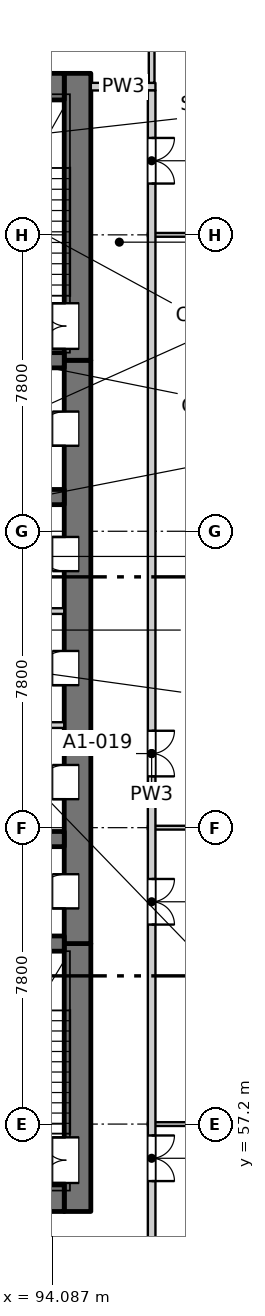
"""IFC4 building model, lengths in metres.
Left out: names, types, materials, properties, quantities, classifications, styles, units other than length and angle.
Written with IfcOpenShell. Run it as: python <this file> out.ifc"""

import sys

from ifc_helpers import new_model, si_unit, direction, frame, frame_2d, origin, place, context, subcontext, project, spatial, rectangle, extrude, element, fill, save


model = new_model("IFC4")
c1 = context("Model", 3, precision=1e-05, world=origin(), true_north=direction((0.0, 1.0)))
c2 = subcontext(c1, "Body", "Model", "MODEL_VIEW")
j1 = project(units=[si_unit("LENGTHUNIT", "METRE"), si_unit("PLANEANGLEUNIT", "RADIAN")], contexts=[c1])
p1 = place(None, origin())
s1 = spatial("IfcSite", under=j1, at=p1, CompositionType="ELEMENT")
p2 = place(p1, origin())
s2 = spatial("IfcBuilding", under=s1, at=p2, CompositionType="ELEMENT")
p3 = place(p2, frame((0.0, 0.0, 15.0)))
s3 = spatial("IfcBuildingStorey", under=s2, at=p3, CompositionType="ELEMENT", Elevation=15.0)
p4 = place(p3, frame((94.75, 54.9, -0.35), z_axis=(0.0, 0.0, 1.0), x_axis=(0.0, 1.0, 0.0)))
e1 = element("IfcWall", 1, at=p4, inside=s3, PredefinedType="SOLIDWALL", context=c2, shape_type="SweptSolid", body=[
    extrude(rectangle(XDim=7.05, YDim=0.7, at=frame_2d((3.525, 0.0))), origin(), (0.0, 0.0, 1.0), 4.6),
])
p5 = place(p4, frame((0.75, 0.0, 0.35)))
e2 = element("IfcOpeningElement", 2, at=p5, cuts=e1, PredefinedType="OPENING", context=c2, shape_type="SweptSolid", body=[
    extrude(rectangle(XDim=1.2, YDim=2.1, at=frame_2d((0.6, 1.05))), frame((0.0, 0.36, 0.0), z_axis=(0.0, -1.0, 0.0), x_axis=(1.0, 0.0, 0.0)), (0.0, 0.0, 1.0), 0.72),
])
p6 = place(p3, frame((94.75, 61.95, -0.35), z_axis=(0.0, 0.0, 1.0), x_axis=(0.0, 1.0, 0.0)))
e3 = element("IfcWall", 3, at=p6, inside=s3, PredefinedType="SOLIDWALL", context=c2, shape_type="SweptSolid", body=[
    extrude(rectangle(XDim=15.35, YDim=0.7, at=frame_2d((7.675, 0.0))), origin(), (0.0, 0.0, 1.0), 4.6),
])
p7 = place(p6, frame((0.925, 0.0, 0.35)))
e4 = element("IfcOpeningElement", 4, at=p7, cuts=e3, PredefinedType="OPENING", context=c2, shape_type="SweptSolid", body=[
    extrude(rectangle(XDim=0.9, YDim=2.1, at=frame_2d((0.45, 1.05))), frame((0.0, 0.36, 0.0), z_axis=(0.0, -1.0, 0.0), x_axis=(1.0, 0.0, 0.0)), (0.0, 0.0, 1.0), 0.72),
])
p8 = place(p6, frame((3.8, 0.0, 0.35)))
e5 = element("IfcOpeningElement", 5, at=p8, cuts=e3, PredefinedType="OPENING", context=c2, shape_type="SweptSolid", body=[
    extrude(rectangle(XDim=0.9, YDim=2.1, at=frame_2d((0.45, 1.05))), frame((0.0, 0.36, 0.0), z_axis=(0.0, -1.0, 0.0), x_axis=(1.0, 0.0, 0.0)), (0.0, 0.0, 1.0), 0.72),
])
p9 = place(p6, frame((6.8, 0.0, 0.35)))
e6 = element("IfcOpeningElement", 6, at=p9, cuts=e3, PredefinedType="OPENING", context=c2, shape_type="SweptSolid", body=[
    extrude(rectangle(XDim=0.9, YDim=2.1, at=frame_2d((0.45, 1.05))), frame((0.0, 0.36, 0.0), z_axis=(0.0, -1.0, 0.0), x_axis=(1.0, 0.0, 0.0)), (0.0, 0.0, 1.0), 0.72),
])
p10 = place(p6, frame((9.8, 0.0, 0.35)))
e7 = element("IfcOpeningElement", 7, at=p10, cuts=e3, PredefinedType="OPENING", context=c2, shape_type="SweptSolid", body=[
    extrude(rectangle(XDim=0.9, YDim=2.1, at=frame_2d((0.45, 1.05))), frame((0.0, 0.36, 0.0), z_axis=(0.0, -1.0, 0.0), x_axis=(1.0, 0.0, 0.0)), (0.0, 0.0, 1.0), 0.72),
])
p11 = place(p6, frame((13.1, 0.0, 0.35)))
e8 = element("IfcOpeningElement", 8, at=p11, cuts=e3, PredefinedType="OPENING", context=c2, shape_type="SweptSolid", body=[
    extrude(rectangle(XDim=0.9, YDim=2.1, at=frame_2d((0.45, 1.05))), frame((0.0, 0.36, 0.0), z_axis=(0.0, -1.0, 0.0), x_axis=(1.0, 0.0, 0.0)), (0.0, 0.0, 1.0), 0.72),
])
p12 = place(p3, frame((94.75, 77.3, -0.35), z_axis=(0.0, 0.0, 1.0), x_axis=(0.0, 1.0, 0.0)))
e9 = element("IfcWall", 9, at=p12, inside=s3, PredefinedType="SOLIDWALL", context=c2, shape_type="SweptSolid", body=[
    extrude(rectangle(XDim=7.55, YDim=0.7, at=frame_2d((3.775, 0.0))), origin(), (0.0, 0.0, 1.0), 4.6),
])
p13 = place(p12, frame((0.3, 0.0, 0.35)))
e10 = element("IfcOpeningElement", 10, at=p13, cuts=e9, PredefinedType="OPENING", context=c2, shape_type="SweptSolid", body=[
    extrude(rectangle(XDim=1.2, YDim=2.1, at=frame_2d((0.6, 1.05))), frame((0.0, 0.36, 0.0), z_axis=(0.0, -1.0, 0.0), x_axis=(1.0, 0.0, 0.0)), (0.0, 0.0, 1.0), 0.72),
])
p14 = place(p3, frame((75.6, 55.25, -0.35), z_axis=(0.0, 0.0, 1.0), x_axis=(1.0, 0.0, 0.0)))
e11 = element("IfcWall", 11, at=p14, inside=s3, PredefinedType="SOLIDWALL", context=c2, shape_type="SweptSolid", body=[
    extrude(rectangle(XDim=18.8, YDim=0.7, at=frame_2d((9.4, 0.0))), origin(), (0.0, 0.0, 1.0), 4.6),
])
p15 = place(p14, frame((8.65, 0.0, 0.35)))
e12 = element("IfcOpeningElement", 12, at=p15, cuts=e11, PredefinedType="OPENING", context=c2, shape_type="SweptSolid", body=[
    extrude(rectangle(XDim=1.5, YDim=2.1, at=frame_2d((0.75, 1.05))), frame((0.0, 0.36, 0.0), z_axis=(0.0, -1.0, 0.0), x_axis=(1.0, 0.0, 0.0)), (0.0, 0.0, 1.0), 0.72),
])
p16 = place(p3, frame((75.6, 84.5, -0.35), z_axis=(0.0, 0.0, 1.0), x_axis=(1.0, 0.0, 0.0)))
e13 = element("IfcWall", 13, at=p16, inside=s3, PredefinedType="SOLIDWALL", context=c2, shape_type="SweptSolid", body=[
    extrude(rectangle(XDim=18.8, YDim=0.7, at=frame_2d((9.4, 0.0))), origin(), (0.0, 0.0, 1.0), 4.6),
])
for number, where, z_axis, x_axis in (
    (14, (90.75, 61.95, -0.35), (0.0, 0.0, 1.0), (1.0, 0.0, 0.0)),
    (15, (90.75, 64.7, -0.35), (0.0, 0.0, 1.0), (1.0, 0.0, 0.0)),
    (16, (90.75, 73.7, -0.35), (0.0, 0.0, 1.0), (1.0, 0.0, 0.0)),
    (17, (90.75, 77.3, -0.35), (0.0, 0.0, 1.0), (1.0, 0.0, 0.0)),
):
    element("IfcWall", number, at=place(p3, frame(where, z_axis=z_axis, x_axis=x_axis)), inside=s3, PredefinedType="SOLIDWALL", context=c2, shape_type="SweptSolid", body=[
        extrude(rectangle(XDim=3.65, YDim=0.4, at=frame_2d((1.825, 0.0))), origin(), (0.0, 0.0, 1.0), 4.6),
    ])
for number, where, z_axis, x_axis in (
    (18, (96.6, 57.2, 0.0), (0.0, 0.0, 1.0), (1.0, 0.0, 0.0)),
    (19, (96.6, 65.0, 0.0), (0.0, 0.0, 1.0), (1.0, 0.0, 0.0)),
):
    element("IfcWall", number, at=place(p3, frame(where, z_axis=z_axis, x_axis=x_axis)), inside=s3, PredefinedType="PARTITIONING", context=c2, shape_type="SweptSolid", body=[
        extrude(rectangle(XDim=4.0, YDim=0.1, at=frame_2d((2.0, 0.0))), origin(), (0.0, 0.0, 1.0), 4.25),
    ])
for number, where, z_axis, x_axis in (
    (20, (90.75, 67.7, 0.0), (0.0, 0.0, 1.0), (1.0, 0.0, 0.0)),
    (21, (90.75, 70.7, 0.0), (0.0, 0.0, 1.0), (1.0, 0.0, 0.0)),
):
    element("IfcWall", number, at=place(p3, frame(where, z_axis=z_axis, x_axis=x_axis)), inside=s3, PredefinedType="PARTITIONING", context=c2, shape_type="SweptSolid", body=[
        extrude(rectangle(XDim=3.65, YDim=0.15, at=frame_2d((1.825, 0.0))), origin(), (0.0, 0.0, 1.0), 4.25),
    ])
p17 = place(p3, frame((96.6, 80.6, 0.0), z_axis=(0.0, 0.0, 1.0), x_axis=(1.0, 0.0, 0.0)))
e22 = element("IfcWall", 22, at=p17, inside=s3, PredefinedType="PARTITIONING", context=c2, shape_type="SweptSolid", body=[
    extrude(rectangle(XDim=4.0, YDim=0.1, at=frame_2d((2.0, 0.0))), origin(), (0.0, 0.0, 1.0), 4.25),
])
p18 = place(p3, frame((95.1, 84.5, 0.0), z_axis=(0.0, 0.0, 1.0), x_axis=(1.0, 0.0, 0.0)))
e23 = element("IfcWall", 23, at=p18, inside=s3, PredefinedType="PARTITIONING", context=c2, shape_type="SweptSolid", body=[
    extrude(rectangle(XDim=1.7, YDim=0.2, at=frame_2d((0.85, 0.0))), origin(), (0.0, 0.0, 1.0), 4.25),
])
p19 = place(p3, frame((96.7, 49.5, 0.0), z_axis=(0.0, 0.0, 1.0), x_axis=(0.0, 1.0, 0.0)))
e24 = element("IfcWall", 24, at=p19, inside=s3, PredefinedType="PARTITIONING", context=c2, shape_type="SweptSolid", body=[
    extrude(rectangle(XDim=34.9, YDim=0.2, at=frame_2d((17.45, 0.0))), origin(), (0.0, 0.0, 1.0), 4.25),
])
p20 = place(p19, frame((6.2, 0.0, 0.0)))
e25 = element("IfcOpeningElement", 25, at=p20, cuts=e24, PredefinedType="OPENING", context=c2, shape_type="SweptSolid", body=[
    extrude(rectangle(XDim=1.2, YDim=2.1, at=frame_2d((0.6, 1.05))), frame((0.0, 0.11, 0.0), z_axis=(0.0, -1.0, 0.0), x_axis=(1.0, 0.0, 0.0)), (0.0, 0.0, 1.0), 0.22),
])
p21 = place(p19, frame((12.95, 0.0, 0.0)))
e26 = element("IfcOpeningElement", 26, at=p21, cuts=e24, PredefinedType="OPENING", context=c2, shape_type="SweptSolid", body=[
    extrude(rectangle(XDim=1.2, YDim=2.1, at=frame_2d((0.6, 1.05))), frame((0.0, 0.11, 0.0), z_axis=(0.0, -1.0, 0.0), x_axis=(1.0, 0.0, 0.0)), (0.0, 0.0, 1.0), 0.22),
])
p22 = place(p19, frame((16.85, 0.0, 0.0)))
e27 = element("IfcOpeningElement", 27, at=p22, cuts=e24, PredefinedType="OPENING", context=c2, shape_type="SweptSolid", body=[
    extrude(rectangle(XDim=1.2, YDim=2.1, at=frame_2d((0.6, 1.05))), frame((0.0, 0.11, 0.0), z_axis=(0.0, -1.0, 0.0), x_axis=(1.0, 0.0, 0.0)), (0.0, 0.0, 1.0), 0.22),
])
p23 = place(p19, frame((32.45, 0.0, 0.0)))
e28 = element("IfcOpeningElement", 28, at=p23, cuts=e24, PredefinedType="OPENING", context=c2, shape_type="SweptSolid", body=[
    extrude(rectangle(XDim=1.2, YDim=2.1, at=frame_2d((0.6, 1.05))), frame((0.0, 0.11, 0.0), z_axis=(0.0, -1.0, 0.0), x_axis=(1.0, 0.0, 0.0)), (0.0, 0.0, 1.0), 0.22),
])
p24 = place(p3, frame((96.7, 84.6, 0.0), z_axis=(0.0, 0.0, 1.0), x_axis=(0.0, 1.0, 0.0)))
e29 = element("IfcWall", 29, at=p24, inside=s3, PredefinedType="PARTITIONING", context=c2, shape_type="SweptSolid", body=[
    extrude(rectangle(XDim=3.665, YDim=0.15, at=frame_2d((1.833, 0.0))), origin(), (0.0, 0.0, 1.0), 4.25),
])
p25 = place(p24, frame((1.25, 0.0, 0.0)))
e30 = element("IfcOpeningElement", 30, at=p25, cuts=e29, PredefinedType="OPENING", context=c2, shape_type="SweptSolid", body=[
    extrude(rectangle(XDim=1.2, YDim=2.1, at=frame_2d((0.6, 1.05))), frame((0.0, 0.085, 0.0), z_axis=(0.0, -1.0, 0.0), x_axis=(1.0, 0.0, 0.0)), (0.0, 0.0, 1.0), 0.17),
])
p26 = place(p5, origin())
e31 = element("IfcDoor", 31, at=p26, inside=s3, OperationType="DOUBLE_DOOR_SINGLE_SWING", PredefinedType="DOOR", context=c2, shape_type="SweptSolid", body=[
    extrude(rectangle(XDim=1.2, YDim=2.1, at=frame_2d((0.6, 1.05))), frame((0.0, 0.335, 0.0), z_axis=(0.0, -1.0, 0.0), x_axis=(1.0, 0.0, 0.0)), (0.0, 0.0, 1.0), 0.05),
])
fill(e2, e31)
p27 = place(p20, origin())
e32 = element("IfcDoor", 32, at=p27, inside=s3, OperationType="DOUBLE_DOOR_SINGLE_SWING", PredefinedType="DOOR", context=c2, shape_type="SweptSolid", body=[
    extrude(rectangle(XDim=1.2, YDim=2.1, at=frame_2d((0.6, 1.05))), frame((0.0, 0.025, 0.0), z_axis=(0.0, -1.0, 0.0), x_axis=(1.0, 0.0, 0.0)), (0.0, 0.0, 1.0), 0.05),
])
fill(e25, e32)
p28 = place(p21, origin())
e33 = element("IfcDoor", 33, at=p28, inside=s3, OperationType="DOUBLE_DOOR_SINGLE_SWING", PredefinedType="DOOR", context=c2, shape_type="SweptSolid", body=[
    extrude(rectangle(XDim=1.2, YDim=2.1, at=frame_2d((0.6, 1.05))), frame((0.0, 0.025, 0.0), z_axis=(0.0, -1.0, 0.0), x_axis=(1.0, 0.0, 0.0)), (0.0, 0.0, 1.0), 0.05),
])
fill(e26, e33)
p29 = place(p7, origin())
e34 = element("IfcDoor", 34, at=p29, inside=s3, OperationType="SINGLE_SWING_LEFT", PredefinedType="DOOR", context=c2, shape_type="SweptSolid", body=[
    extrude(rectangle(XDim=0.9, YDim=2.1, at=frame_2d((0.45, 1.05))), frame((0.0, 0.335, 0.0), z_axis=(0.0, -1.0, 0.0), x_axis=(1.0, 0.0, 0.0)), (0.0, 0.0, 1.0), 0.05),
])
fill(e4, e34)
p30 = place(p8, origin())
e35 = element("IfcDoor", 35, at=p30, inside=s3, OperationType="SINGLE_SWING_LEFT", PredefinedType="DOOR", context=c2, shape_type="SweptSolid", body=[
    extrude(rectangle(XDim=0.9, YDim=2.1, at=frame_2d((0.45, 1.05))), frame((0.0, 0.335, 0.0), z_axis=(0.0, -1.0, 0.0), x_axis=(1.0, 0.0, 0.0)), (0.0, 0.0, 1.0), 0.05),
])
fill(e5, e35)
p31 = place(p22, origin())
e36 = element("IfcDoor", 36, at=p31, inside=s3, OperationType="DOUBLE_DOOR_SINGLE_SWING", PredefinedType="DOOR", context=c2, shape_type="SweptSolid", body=[
    extrude(rectangle(XDim=1.2, YDim=2.1, at=frame_2d((0.6, 1.05))), frame((0.0, 0.025, 0.0), z_axis=(0.0, -1.0, 0.0), x_axis=(1.0, 0.0, 0.0)), (0.0, 0.0, 1.0), 0.05),
])
fill(e27, e36)
p32 = place(p9, origin())
e37 = element("IfcDoor", 37, at=p32, inside=s3, OperationType="SINGLE_SWING_LEFT", PredefinedType="DOOR", context=c2, shape_type="SweptSolid", body=[
    extrude(rectangle(XDim=0.9, YDim=2.1, at=frame_2d((0.45, 1.05))), frame((0.0, 0.335, 0.0), z_axis=(0.0, -1.0, 0.0), x_axis=(1.0, 0.0, 0.0)), (0.0, 0.0, 1.0), 0.05),
])
fill(e6, e37)
p33 = place(p10, origin())
e38 = element("IfcDoor", 38, at=p33, inside=s3, OperationType="SINGLE_SWING_RIGHT", PredefinedType="DOOR", context=c2, shape_type="SweptSolid", body=[
    extrude(rectangle(XDim=0.9, YDim=2.1, at=frame_2d((0.45, 1.05))), frame((0.0, 0.335, 0.0), z_axis=(0.0, -1.0, 0.0), x_axis=(1.0, 0.0, 0.0)), (0.0, 0.0, 1.0), 0.05),
])
fill(e7, e38)
p34 = place(p11, origin())
e39 = element("IfcDoor", 39, at=p34, inside=s3, OperationType="SINGLE_SWING_LEFT", PredefinedType="DOOR", context=c2, shape_type="SweptSolid", body=[
    extrude(rectangle(XDim=0.9, YDim=2.1, at=frame_2d((0.45, 1.05))), frame((0.0, 0.335, 0.0), z_axis=(0.0, -1.0, 0.0), x_axis=(1.0, 0.0, 0.0)), (0.0, 0.0, 1.0), 0.05),
])
fill(e8, e39)
p35 = place(p13, origin())
e40 = element("IfcDoor", 40, at=p35, inside=s3, OperationType="DOUBLE_DOOR_SINGLE_SWING", PredefinedType="DOOR", context=c2, shape_type="SweptSolid", body=[
    extrude(rectangle(XDim=1.2, YDim=2.1, at=frame_2d((0.6, 1.05))), frame((0.0, 0.335, 0.0), z_axis=(0.0, -1.0, 0.0), x_axis=(1.0, 0.0, 0.0)), (0.0, 0.0, 1.0), 0.05),
])
fill(e10, e40)
p36 = place(p23, origin())
e41 = element("IfcDoor", 41, at=p36, inside=s3, OperationType="DOUBLE_DOOR_SINGLE_SWING", PredefinedType="DOOR", context=c2, shape_type="SweptSolid", body=[
    extrude(rectangle(XDim=1.2, YDim=2.1, at=frame_2d((0.6, 1.05))), frame((0.0, 0.025, 0.0), z_axis=(0.0, -1.0, 0.0), x_axis=(1.0, 0.0, 0.0)), (0.0, 0.0, 1.0), 0.05),
])
fill(e28, e41)
save(model, sys.argv[1])
